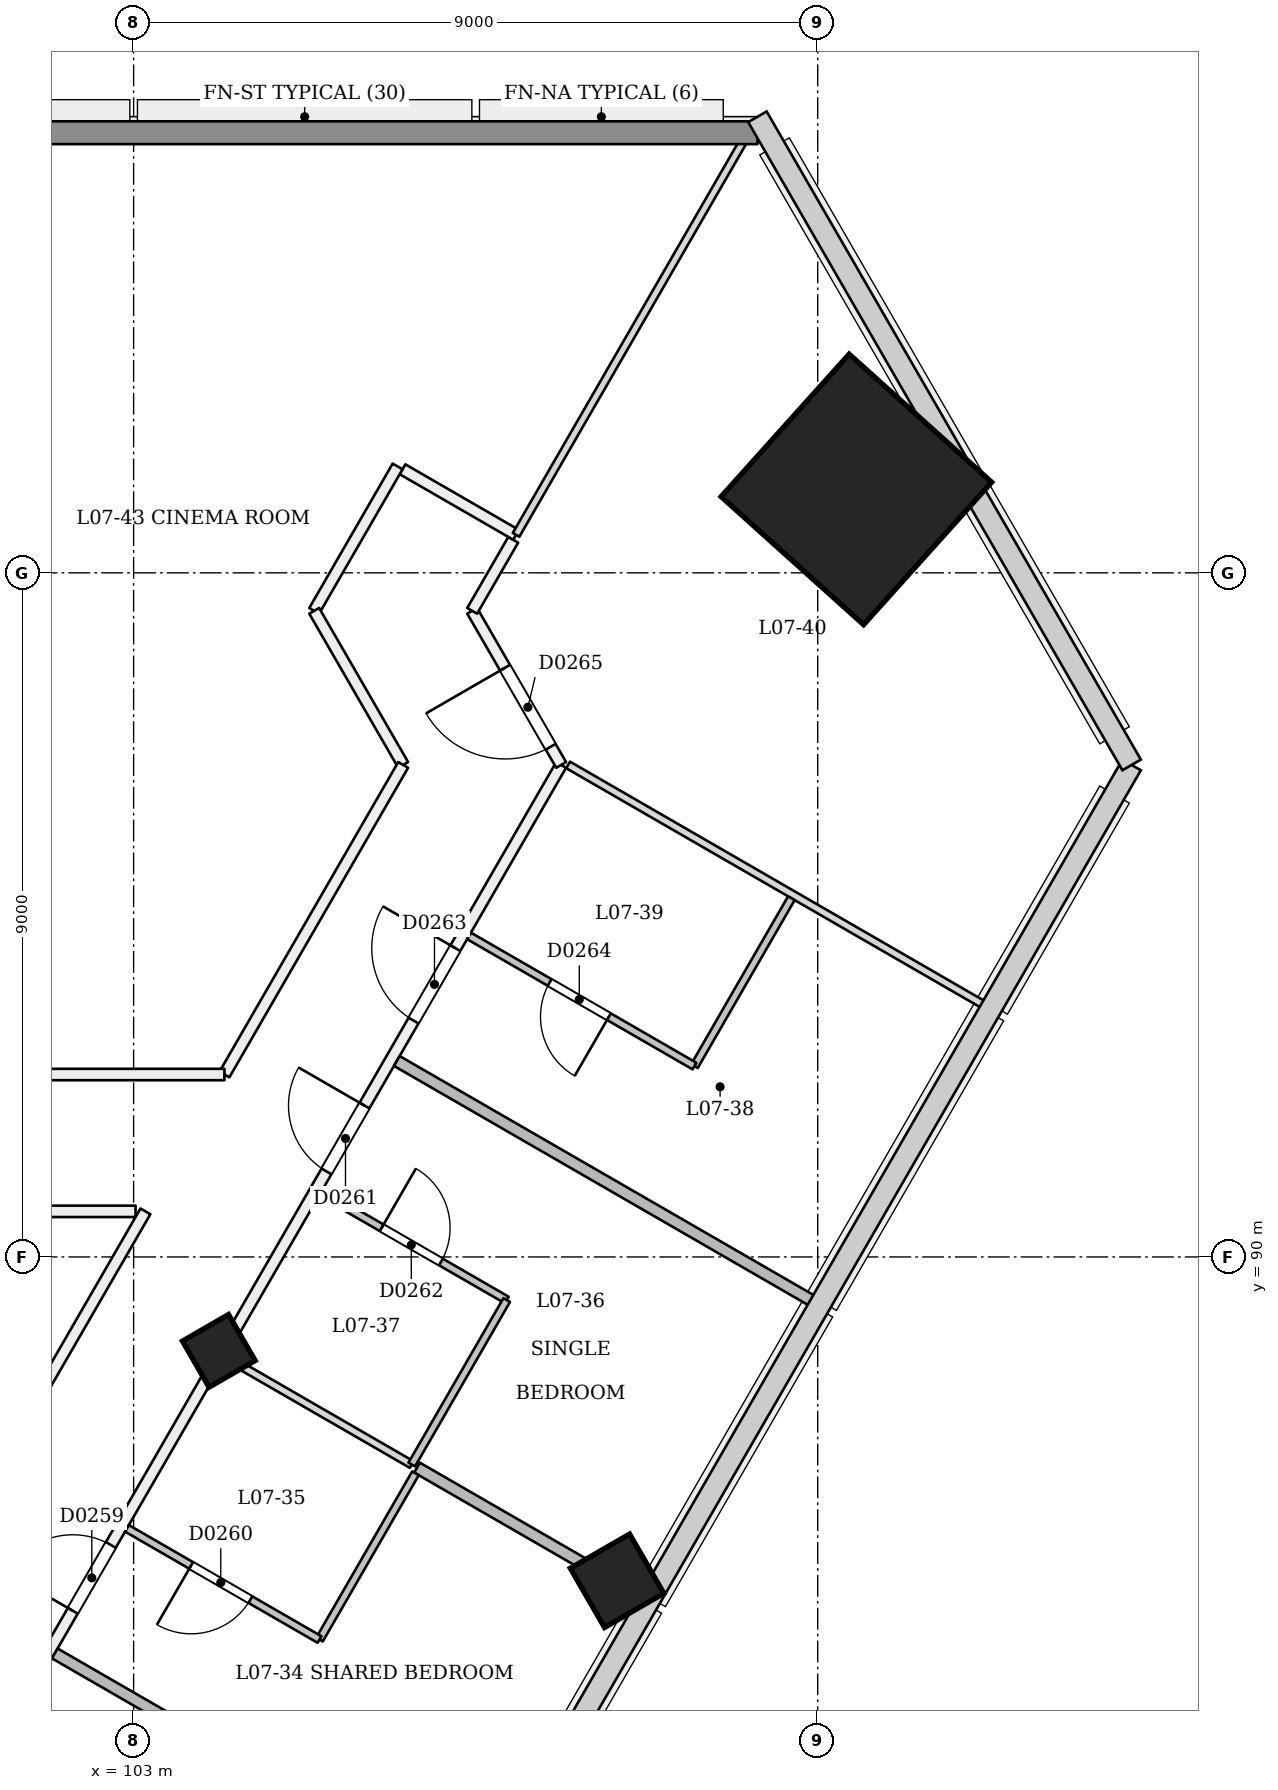
"""IFC4 building model, lengths in metres.
Left out: names, types, materials, properties, quantities, classifications, styles, units other than length and angle.
Written with IfcOpenShell. Run it as: python <this file> out.ifc"""

import sys

from ifc_helpers import new_model, si_unit, direction, frame, frame_2d, origin, origin_2d, place, context, subcontext, project, spatial, rectangle, extrude, element, fill, save


model = new_model("IFC4")
c1 = context("Model", 3, precision=1e-05, world=origin(), true_north=direction((0.0, 1.0)))
c2 = subcontext(c1, "Body", "Model", "MODEL_VIEW")
j1 = project(units=[si_unit("LENGTHUNIT", "METRE"), si_unit("PLANEANGLEUNIT", "RADIAN")], contexts=[c1])
p1 = place(None, origin())
s1 = spatial("IfcSite", under=j1, at=p1, CompositionType="ELEMENT")
p2 = place(p1, origin())
s2 = spatial("IfcBuilding", under=s1, at=p2, CompositionType="ELEMENT")
p3 = place(p2, frame((0.0, 0.0, 34.2)))
s3 = spatial("IfcBuildingStorey", under=s2, at=p3, CompositionType="ELEMENT", Elevation=34.2)
p4 = place(p3, frame((104.148, 88.718, -0.021), z_axis=(-0.02222134892, 0.038480872521, 0.999012229206), x_axis=(-0.500174592943, -0.865639497158, 0.022217955235)))
e1 = element("IfcColumn", 1, at=p4, inside=s3, PredefinedType="COLUMN", context=c2, shape_type="SweptSolid", body=[
    extrude(rectangle(XDim=0.7, YDim=0.7, at=origin_2d()), origin(), (0.0, 0.0, 1.0), 3.604),
])
p5 = place(p3, frame((112.543, 100.086, 0.0), z_axis=(-0.028401796786, 0.009286506348, 0.999553449666), x_axis=(0.498881273913, -0.866385327315, 0.02222474187)))
e2 = element("IfcColumn", 2, at=p5, inside=s3, PredefinedType="COLUMN", context=c2, shape_type="SweptSolid", body=[
    extrude(rectangle(XDim=2.52, YDim=2.52, at=origin_2d()), origin(), (0.0, 0.0, 1.0), 3.602),
])
p6 = place(p3, frame((109.387, 85.692, -0.027), z_axis=(-0.022221406801, 0.038413224561, 0.999014831351), x_axis=(-0.499512940858, -0.866022219206, 0.022188685317)))
e3 = element("IfcColumn", 3, at=p6, inside=s3, PredefinedType="COLUMN", context=c2, shape_type="SweptSolid", body=[
    extrude(rectangle(XDim=0.9, YDim=0.9, at=origin_2d()), origin(), (0.0, 0.0, 1.0), 3.604),
])
p7 = place(p3, frame((86.17, 57.581, 0.0), z_axis=(0.0, 0.0, 1.0), x_axis=(0.499999785607, 0.866025527565, 0.0)))
e4 = element("IfcWall", 4, at=p7, inside=s3, PredefinedType="PARTITIONING", context=c2, shape_type="SweptSolid", body=[
    extrude(rectangle(XDim=44.909, YDim=0.15, at=frame_2d((22.454, 0.0))), origin(), (0.0, 0.0, 1.0), 2.7),
])
p8 = place(p7, frame((0.675, 0.0, 0.0)))
e5 = element("IfcOpeningElement", 5, at=p8, cuts=e4, PredefinedType="OPENING", context=c2, shape_type="SweptSolid", body=[
    extrude(rectangle(XDim=1.0, YDim=2.1, at=frame_2d((0.5, 1.05))), frame((0.0, 0.085, 0.0), z_axis=(0.0, -1.0, 0.0), x_axis=(1.0, 0.0, 0.0)), (0.0, 0.0, 1.0), 0.171),
])
p9 = place(p7, frame((5.175, 0.0, 0.0)))
e6 = element("IfcOpeningElement", 6, at=p9, cuts=e4, PredefinedType="OPENING", context=c2, shape_type="SweptSolid", body=[
    extrude(rectangle(XDim=1.0, YDim=2.1, at=frame_2d((0.5, 1.05))), frame((0.0, 0.085, 0.0), z_axis=(0.0, -1.0, 0.0), x_axis=(1.0, 0.0, 0.0)), (0.0, 0.0, 1.0), 0.171),
])
p10 = place(p7, frame((11.734, 0.0, 0.0)))
e7 = element("IfcOpeningElement", 7, at=p10, cuts=e4, PredefinedType="OPENING", context=c2, shape_type="SweptSolid", body=[
    extrude(rectangle(XDim=1.0, YDim=2.1, at=frame_2d((0.5, 1.05))), frame((0.0, 0.085, 0.0), z_axis=(0.0, -1.0, 0.0), x_axis=(1.0, 0.0, 0.0)), (0.0, 0.0, 1.0), 0.171),
])
p11 = place(p7, frame((14.175, 0.0, 0.0)))
e8 = element("IfcOpeningElement", 8, at=p11, cuts=e4, PredefinedType="OPENING", context=c2, shape_type="SweptSolid", body=[
    extrude(rectangle(XDim=1.0, YDim=2.1, at=frame_2d((0.5, 1.05))), frame((0.0, 0.085, 0.0), z_axis=(0.0, -1.0, 0.0), x_axis=(1.0, 0.0, 0.0)), (0.0, 0.0, 1.0), 0.171),
])
p12 = place(p7, frame((19.704, 0.0, 0.0)))
e9 = element("IfcOpeningElement", 9, at=p12, cuts=e4, PredefinedType="OPENING", context=c2, shape_type="SweptSolid", body=[
    extrude(rectangle(XDim=1.0, YDim=2.1, at=frame_2d((0.5, 1.05))), frame((0.0, 0.085, 0.0), z_axis=(0.0, -1.0, 0.0), x_axis=(1.0, 0.0, 0.0)), (0.0, 0.0, 1.0), 0.171),
])
p13 = place(p7, frame((23.175, 0.0, 0.0)))
e10 = element("IfcOpeningElement", 10, at=p13, cuts=e4, PredefinedType="OPENING", context=c2, shape_type="SweptSolid", body=[
    extrude(rectangle(XDim=1.0, YDim=2.1, at=frame_2d((0.5, 1.05))), frame((0.0, 0.085, 0.0), z_axis=(0.0, -1.0, 0.0), x_axis=(1.0, 0.0, 0.0)), (0.0, 0.0, 1.0), 0.171),
])
p14 = place(p7, frame((29.85, 0.0, 0.0)))
e11 = element("IfcOpeningElement", 11, at=p14, cuts=e4, PredefinedType="OPENING", context=c2, shape_type="SweptSolid", body=[
    extrude(rectangle(XDim=1.0, YDim=2.1, at=frame_2d((0.5, 1.05))), frame((0.0, 0.085, 0.0), z_axis=(0.0, -1.0, 0.0), x_axis=(1.0, 0.0, 0.0)), (0.0, 0.0, 1.0), 0.171),
])
p15 = place(p7, frame((32.059, 0.0, 0.0)))
e12 = element("IfcOpeningElement", 12, at=p15, cuts=e4, PredefinedType="OPENING", context=c2, shape_type="SweptSolid", body=[
    extrude(rectangle(XDim=1.0, YDim=2.1, at=frame_2d((0.5, 1.05))), frame((0.0, 0.085, 0.0), z_axis=(0.0, -1.0, 0.0), x_axis=(1.0, 0.0, 0.0)), (0.0, 0.0, 1.0), 0.171),
])
p16 = place(p7, frame((38.734, 0.0, 0.0)))
e13 = element("IfcOpeningElement", 13, at=p16, cuts=e4, PredefinedType="OPENING", context=c2, shape_type="SweptSolid", body=[
    extrude(rectangle(XDim=1.0, YDim=2.1, at=frame_2d((0.5, 1.05))), frame((0.0, 0.085, 0.0), z_axis=(0.0, -1.0, 0.0), x_axis=(1.0, 0.0, 0.0)), (0.0, 0.0, 1.0), 0.171),
])
p17 = place(p7, frame((41.025, 0.0, 0.0)))
e14 = element("IfcOpeningElement", 14, at=p17, cuts=e4, PredefinedType="OPENING", context=c2, shape_type="SweptSolid", body=[
    extrude(rectangle(XDim=1.1, YDim=2.1, at=frame_2d((0.55, 1.05))), frame((0.0, 0.085, 0.0), z_axis=(0.0, -1.0, 0.0), x_axis=(1.0, 0.0, 0.0)), (0.0, 0.0, 1.0), 0.171),
])
p18 = place(p3, frame((108.625, 96.473, 0.0), z_axis=(0.0, 0.0, 1.0), x_axis=(-0.499987330634, 0.866032718323, 0.0)))
e15 = element("IfcWall", 15, at=p18, inside=s3, PredefinedType="PARTITIONING", context=c2, shape_type="SweptSolid", body=[
    extrude(rectangle(XDim=2.34, YDim=0.15, at=frame_2d((1.17, 0.0))), origin(), (0.0, 0.0, 1.0), 3.1),
])
p19 = place(p18, frame((0.276, 0.0, 0.0)))
e16 = element("IfcOpeningElement", 16, at=p19, cuts=e15, PredefinedType="OPENING", context=c2, shape_type="SweptSolid", body=[
    extrude(rectangle(XDim=1.2, YDim=2.1, at=frame_2d((0.6, 1.05))), frame((0.0, 0.085, 0.0), z_axis=(0.0, -1.0, 0.0), x_axis=(1.0, 0.0, 0.0)), (0.0, 0.0, 1.0), 0.171),
])
p20 = place(p3, frame((107.454, 98.5, 0.0), z_axis=(0.0, 0.0, 1.0), x_axis=(0.499957341738, 0.866050031143, 0.0)))
e17 = element("IfcWall", 17, at=p20, inside=s3, PredefinedType="PARTITIONING", context=c2, shape_type="SweptSolid", body=[
    extrude(rectangle(XDim=1.08, YDim=0.15, at=frame_2d((0.54, 0.0))), origin(), (0.0, 0.0, 1.0), 3.1),
])
p21 = place(p3, frame((108.032, 99.5, 0.0), z_axis=(0.0, 0.0, 1.0), x_axis=(-0.866013532718, 0.500020560727, 0.0)))
e18 = element("IfcWall", 18, at=p21, inside=s3, PredefinedType="PARTITIONING", context=c2, shape_type="SweptSolid", body=[
    extrude(rectangle(XDim=1.725, YDim=0.15, at=frame_2d((0.863, 0.0))), origin(), (0.0, 0.0, 1.0), 3.1),
])
p22 = place(p3, frame((106.473, 100.4, 0.0), z_axis=(0.0, 0.0, 1.0), x_axis=(-0.500005024956, -0.866022502605, 0.0)))
e19 = element("IfcWall", 19, at=p22, inside=s3, PredefinedType="PARTITIONING", context=c2, shape_type="SweptSolid", body=[
    extrude(rectangle(XDim=2.194, YDim=0.15, at=frame_2d((1.097, 0.0))), origin(), (0.0, 0.0, 1.0), 3.1),
])
p23 = place(p3, frame((105.376, 98.5, 0.0), z_axis=(0.0, 0.0, 1.0), x_axis=(0.500065562951, -0.865987547688, 0.0)))
e20 = element("IfcWall", 20, at=p23, inside=s3, PredefinedType="PARTITIONING", context=c2, shape_type="SweptSolid", body=[
    extrude(rectangle(XDim=2.341, YDim=0.15, at=frame_2d((1.17, 0.0))), origin(), (0.0, 0.0, 1.0), 3.1),
])
p24 = place(p3, frame((106.546, 96.473, 0.0), z_axis=(0.0, 0.0, 1.0), x_axis=(-0.499980071345, -0.866036909293, 0.0)))
e21 = element("IfcWall", 21, at=p24, inside=s3, PredefinedType="PARTITIONING", context=c2, shape_type="SweptSolid", body=[
    extrude(rectangle(XDim=4.703, YDim=0.15, at=frame_2d((2.352, 0.0))), origin(), (0.0, 0.0, 1.0), 3.1),
])
p25 = place(p3, frame((104.195, 92.4, 0.0), z_axis=(0.0, 0.0, 1.0), x_axis=(-1.0, 0.0, 0.0)))
e22 = element("IfcWall", 22, at=p25, inside=s3, PredefinedType="PARTITIONING", context=c2, shape_type="SweptSolid", body=[
    extrude(rectangle(XDim=4.32, YDim=0.15, at=frame_2d((2.16, 0.0))), origin(), (0.0, 0.0, 1.0), 3.1),
])
p26 = place(p3, frame((88.0, 90.599, 0.0), z_axis=(0.0, 0.0, 1.0), x_axis=(0.999999997888, 6.499415e-05, 0.0)))
e23 = element("IfcWall", 23, at=p26, inside=s3, PredefinedType="PARTITIONING", context=c2, shape_type="SweptSolid", body=[
    extrude(rectangle(XDim=15.025, YDim=0.15, at=frame_2d((7.513, 0.0))), origin(), (0.0, 0.0, 1.0), 3.1),
])
p27 = place(p26, frame((0.2, 0.0, 0.0)))
e24 = element("IfcOpeningElement", 24, at=p27, cuts=e23, PredefinedType="OPENING", context=c2, shape_type="SweptSolid", body=[
    extrude(rectangle(XDim=1.2, YDim=2.1, at=frame_2d((0.6, 1.05))), frame((0.0, 0.085, 0.0), z_axis=(0.0, -1.0, 0.0), x_axis=(1.0, 0.0, 0.0)), (0.0, 0.0, 1.0), 0.171),
])
p28 = place(p3, frame((103.155, 90.6, 0.0), z_axis=(0.0, 0.0, 1.0), x_axis=(-0.499997404558, -0.866026902258, 0.0)))
e25 = element("IfcWall", 25, at=p28, inside=s3, PredefinedType="PARTITIONING", context=c2, shape_type="SweptSolid", body=[
    extrude(rectangle(XDim=36.049, YDim=0.15, at=frame_2d((18.024, 0.0))), origin(), (0.0, 0.0, 1.0), 3.1),
])
p29 = place(p28, frame((7.809, 0.0, 0.0)))
e26 = element("IfcOpeningElement", 26, at=p29, cuts=e25, PredefinedType="OPENING", context=c2, shape_type="SweptSolid", body=[
    extrude(rectangle(XDim=1.2, YDim=2.1, at=frame_2d((0.6, 1.05))), frame((0.0, 0.085, 0.0), z_axis=(0.0, -1.0, 0.0), x_axis=(1.0, 0.0, 0.0)), (0.0, 0.0, 1.0), 0.171),
])
p30 = place(p28, frame((19.731, 0.0, 0.0)))
e27 = element("IfcOpeningElement", 27, at=p30, cuts=e25, PredefinedType="OPENING", context=c2, shape_type="SweptSolid", body=[
    extrude(rectangle(XDim=1.2, YDim=2.1, at=frame_2d((0.6, 1.05))), frame((0.0, 0.085, 0.0), z_axis=(0.0, -1.0, 0.0), x_axis=(1.0, 0.0, 0.0)), (0.0, 0.0, 1.0), 0.171),
])
p31 = place(p3, frame((107.458, 81.611, 0.0), z_axis=(0.0, 0.0, 1.0), x_axis=(-0.866025401434, 0.500000004071, 0.0)))
e28 = element("IfcWall", 28, at=p31, inside=s3, PredefinedType="PARTITIONING", context=c2, shape_type="SweptSolid", body=[
    extrude(rectangle(XDim=6.345, YDim=0.15, at=frame_2d((3.173, 0.0))), origin(), (0.0, 0.0, 1.0), 2.6),
])
p32 = place(p3, frame((106.708, 87.154, 0.0), z_axis=(0.0, 0.0, 1.0), x_axis=(-0.499976333282, -0.866039067339, 0.0)))
e29 = element("IfcWall", 29, at=p32, inside=s3, PredefinedType="PARTITIONING", context=c2, shape_type="SweptSolid", body=[
    extrude(rectangle(XDim=2.525, YDim=0.1, at=frame_2d((1.262, 0.0))), origin(), (0.0, 0.0, 1.0), 2.7),
])
p33 = place(p3, frame((105.446, 84.967, 0.0), z_axis=(0.0, 0.0, 1.0), x_axis=(-0.866046596414, 0.499963291492, 0.0)))
e30 = element("IfcWall", 30, at=p33, inside=s3, PredefinedType="PARTITIONING", context=c2, shape_type="SweptSolid", body=[
    extrude(rectangle(XDim=2.925, YDim=0.1, at=frame_2d((1.462, 0.0))), origin(), (0.0, 0.0, 1.0), 3.1),
])
p34 = place(p33, frame((1.05, 0.0, 0.0)))
e31 = element("IfcOpeningElement", 31, at=p34, cuts=e30, PredefinedType="OPENING", context=c2, shape_type="SweptSolid", body=[
    extrude(rectangle(XDim=0.9, YDim=2.1, at=frame_2d((0.45, 1.05))), frame((0.0, 0.061, 0.0), z_axis=(0.0, -1.0, 0.0), x_axis=(1.0, 0.0, 0.0)), (0.0, 0.0, 1.0), 0.121),
])
p35 = place(p3, frame((109.69, 85.519, 0.0), z_axis=(0.0, 0.0, 1.0), x_axis=(-0.866038183914, 0.499977863513, 0.0)))
e32 = element("IfcWall", 32, at=p35, inside=s3, PredefinedType="PARTITIONING", context=c2, shape_type="SweptSolid", body=[
    extrude(rectangle(XDim=3.42, YDim=0.15, at=frame_2d((1.71, 0.0))), origin(), (0.0, 0.0, 1.0), 2.6),
])
p36 = place(p3, frame((106.659, 87.269, 0.0), z_axis=(0.0, 0.0, 1.0), x_axis=(-0.866048868473, 0.499959355765, 0.0)))
e33 = element("IfcWall", 33, at=p36, inside=s3, PredefinedType="PARTITIONING", context=c2, shape_type="SweptSolid", body=[
    extrude(rectangle(XDim=2.825, YDim=0.1, at=frame_2d((1.413, 0.0))), origin(), (0.0, 0.0, 1.0), 2.7),
])
p37 = place(p3, frame((105.462, 90.846, 0.0), z_axis=(0.0, 0.0, 1.0), x_axis=(0.866048868473, -0.499959355765, 0.0)))
e34 = element("IfcWall", 34, at=p37, inside=s3, PredefinedType="PARTITIONING", context=c2, shape_type="SweptSolid", body=[
    extrude(rectangle(XDim=2.825, YDim=0.1, at=frame_2d((1.413, 0.0))), origin(), (0.0, 0.0, 1.0), 3.1),
])
p38 = place(p37, frame((0.925, 0.0, 0.0)))
e35 = element("IfcOpeningElement", 35, at=p38, cuts=e34, PredefinedType="OPENING", context=c2, shape_type="SweptSolid", body=[
    extrude(rectangle(XDim=0.9, YDim=2.1, at=frame_2d((0.45, 1.05))), frame((0.0, 0.061, 0.0), z_axis=(0.0, -1.0, 0.0), x_axis=(1.0, 0.0, 0.0)), (0.0, 0.0, 1.0), 0.121),
])
p39 = place(p3, frame((107.909, 89.434, 0.0), z_axis=(0.0, 0.0, 1.0), x_axis=(-0.500004234368, -0.866022959057, 0.0)))
e36 = element("IfcWall", 36, at=p39, inside=s3, PredefinedType="PARTITIONING", context=c2, shape_type="SweptSolid", body=[
    extrude(rectangle(XDim=2.5, YDim=0.1, at=frame_2d((1.25, 0.0))), origin(), (0.0, 0.0, 1.0), 2.7),
])
p40 = place(p3, frame((111.958, 89.406, 0.0), z_axis=(0.0, 0.0, 1.0), x_axis=(-0.866025401434, 0.500000004071, 0.0)))
e37 = element("IfcWall", 37, at=p40, inside=s3, PredefinedType="PARTITIONING", context=c2, shape_type="SweptSolid", body=[
    extrude(rectangle(XDim=6.345, YDim=0.15, at=frame_2d((3.173, 0.0))), origin(), (0.0, 0.0, 1.0), 2.6),
])
p41 = place(p3, frame((111.654, 94.719, 0.0), z_axis=(0.0, 0.0, 1.0), x_axis=(-0.500020783669, -0.866013403995, 0.0)))
e38 = element("IfcWall", 38, at=p41, inside=s3, PredefinedType="PARTITIONING", context=c2, shape_type="SweptSolid", body=[
    extrude(rectangle(XDim=2.55, YDim=0.1, at=frame_2d((1.275, 0.0))), origin(), (0.0, 0.0, 1.0), 2.6),
])
p42 = place(p3, frame((110.378, 92.511, 0.0), z_axis=(0.0, 0.0, 1.0), x_axis=(-0.866032454348, 0.499987787867, 0.0)))
e39 = element("IfcWall", 39, at=p42, inside=s3, PredefinedType="PARTITIONING", context=c2, shape_type="SweptSolid", body=[
    extrude(rectangle(XDim=3.425, YDim=0.1, at=frame_2d((1.712, 0.0))), origin(), (0.0, 0.0, 1.0), 3.1),
])
p43 = place(p42, frame((1.3, 0.0, 0.0)))
e40 = element("IfcOpeningElement", 40, at=p43, cuts=e39, PredefinedType="OPENING", context=c2, shape_type="SweptSolid", body=[
    extrude(rectangle(XDim=0.9, YDim=2.1, at=frame_2d((0.45, 1.05))), frame((0.0, 0.061, 0.0), z_axis=(0.0, -1.0, 0.0), x_axis=(1.0, 0.0, 0.0)), (0.0, 0.0, 1.0), 0.121),
])
p44 = place(p3, frame((114.208, 93.302, 0.0), z_axis=(0.0, 0.0, 1.0), x_axis=(-0.866014393704, 0.500019069534, 0.0)))
e41 = element("IfcWall", 41, at=p44, inside=s3, PredefinedType="PARTITIONING", context=c2, shape_type="SweptSolid", body=[
    extrude(rectangle(XDim=6.341, YDim=0.1, at=frame_2d((3.17, 0.0))), origin(), (0.0, 0.0, 1.0), 2.6),
])
p45 = place(p3, frame((111.149, 104.9, 0.0), z_axis=(0.0, 0.0, 1.0), x_axis=(-0.500004896655, -0.866022576681, 0.0)))
e42 = element("IfcWall", 42, at=p45, inside=s3, PredefinedType="PARTITIONING", context=c2, shape_type="SweptSolid", body=[
    extrude(rectangle(XDim=6.235, YDim=0.1, at=frame_2d((3.118, 0.0))), origin(), (0.0, 0.0, 1.0), 2.6),
])
p46 = place(p3, frame((58.793, 104.79, 0.0), z_axis=(0.0, 0.0, 1.0), x_axis=(1.0, 0.0, 0.0)))
e43 = element("IfcWall", 43, at=p46, inside=s3, PredefinedType="SOLIDWALL", context=c2, shape_type="SweptSolid", body=[
    extrude(rectangle(XDim=52.414, YDim=0.3, at=frame_2d((26.207, 0.0))), origin(), (0.0, 0.0, 1.0), 2.6),
])
p47 = place(p15, origin())
e44 = element("IfcDoor", 44, at=p47, inside=s3, OperationType="SINGLE_SWING_LEFT", PredefinedType="NOTDEFINED", context=c2, shape_type="SweptSolid", body=[
    extrude(rectangle(XDim=1.0, YDim=2.1, at=frame_2d((0.5, 1.05))), frame((0.0, 0.025, 0.0), z_axis=(0.0, -1.0, 0.0), x_axis=(1.0, 0.0, 0.0)), (0.0, 0.0, 1.0), 0.05),
])
fill(e12, e44)
p48 = place(p34, origin())
e45 = element("IfcDoor", 45, at=p48, inside=s3, OperationType="SINGLE_SWING_RIGHT", PredefinedType="NOTDEFINED", context=c2, shape_type="SweptSolid", body=[
    extrude(rectangle(XDim=0.9, YDim=2.1, at=frame_2d((0.45, 1.05))), frame((0.0, 0.025, 0.0), z_axis=(0.0, -1.0, 0.0), x_axis=(1.0, 0.0, 0.0)), (0.0, 0.0, 1.0), 0.05),
])
fill(e31, e45)
p49 = place(p16, origin())
e46 = element("IfcDoor", 46, at=p49, inside=s3, OperationType="SINGLE_SWING_RIGHT", PredefinedType="NOTDEFINED", context=c2, shape_type="SweptSolid", body=[
    extrude(rectangle(XDim=1.0, YDim=2.1, at=frame_2d((0.5, 1.05))), frame((0.0, 0.025, 0.0), z_axis=(0.0, -1.0, 0.0), x_axis=(1.0, 0.0, 0.0)), (0.0, 0.0, 1.0), 0.05),
])
fill(e13, e46)
p50 = place(p38, origin())
e47 = element("IfcDoor", 47, at=p50, inside=s3, OperationType="SINGLE_SWING_LEFT", PredefinedType="NOTDEFINED", context=c2, shape_type="SweptSolid", body=[
    extrude(rectangle(XDim=0.9, YDim=2.1, at=frame_2d((0.45, 1.05))), frame((0.0, 0.025, 0.0), z_axis=(0.0, -1.0, 0.0), x_axis=(1.0, 0.0, 0.0)), (0.0, 0.0, 1.0), 0.05),
])
fill(e35, e47)
p51 = place(p17, origin())
e48 = element("IfcDoor", 48, at=p51, inside=s3, OperationType="SINGLE_SWING_RIGHT", PredefinedType="NOTDEFINED", context=c2, shape_type="SweptSolid", body=[
    extrude(rectangle(XDim=1.1, YDim=2.1, at=frame_2d((0.55, 1.05))), frame((0.0, 0.025, 0.0), z_axis=(0.0, -1.0, 0.0), x_axis=(1.0, 0.0, 0.0)), (0.0, 0.0, 1.0), 0.05),
])
fill(e14, e48)
p52 = place(p43, origin())
e49 = element("IfcDoor", 49, at=p52, inside=s3, OperationType="SINGLE_SWING_LEFT", PredefinedType="NOTDEFINED", context=c2, shape_type="SweptSolid", body=[
    extrude(rectangle(XDim=0.9, YDim=2.1, at=frame_2d((0.45, 1.05))), frame((0.0, 0.025, 0.0), z_axis=(0.0, -1.0, 0.0), x_axis=(1.0, 0.0, 0.0)), (0.0, 0.0, 1.0), 0.05),
])
fill(e40, e49)
p53 = place(p19, origin())
e50 = element("IfcDoor", 50, at=p53, inside=s3, OperationType="SINGLE_SWING_RIGHT", PredefinedType="NOTDEFINED", context=c2, shape_type="SweptSolid", body=[
    extrude(rectangle(XDim=1.2, YDim=2.1, at=frame_2d((0.6, 1.05))), frame((0.0, 0.025, 0.0), z_axis=(0.0, -1.0, 0.0), x_axis=(1.0, 0.0, 0.0)), (0.0, 0.0, 1.0), 0.05),
])
fill(e16, e50)
save(model, sys.argv[1])
